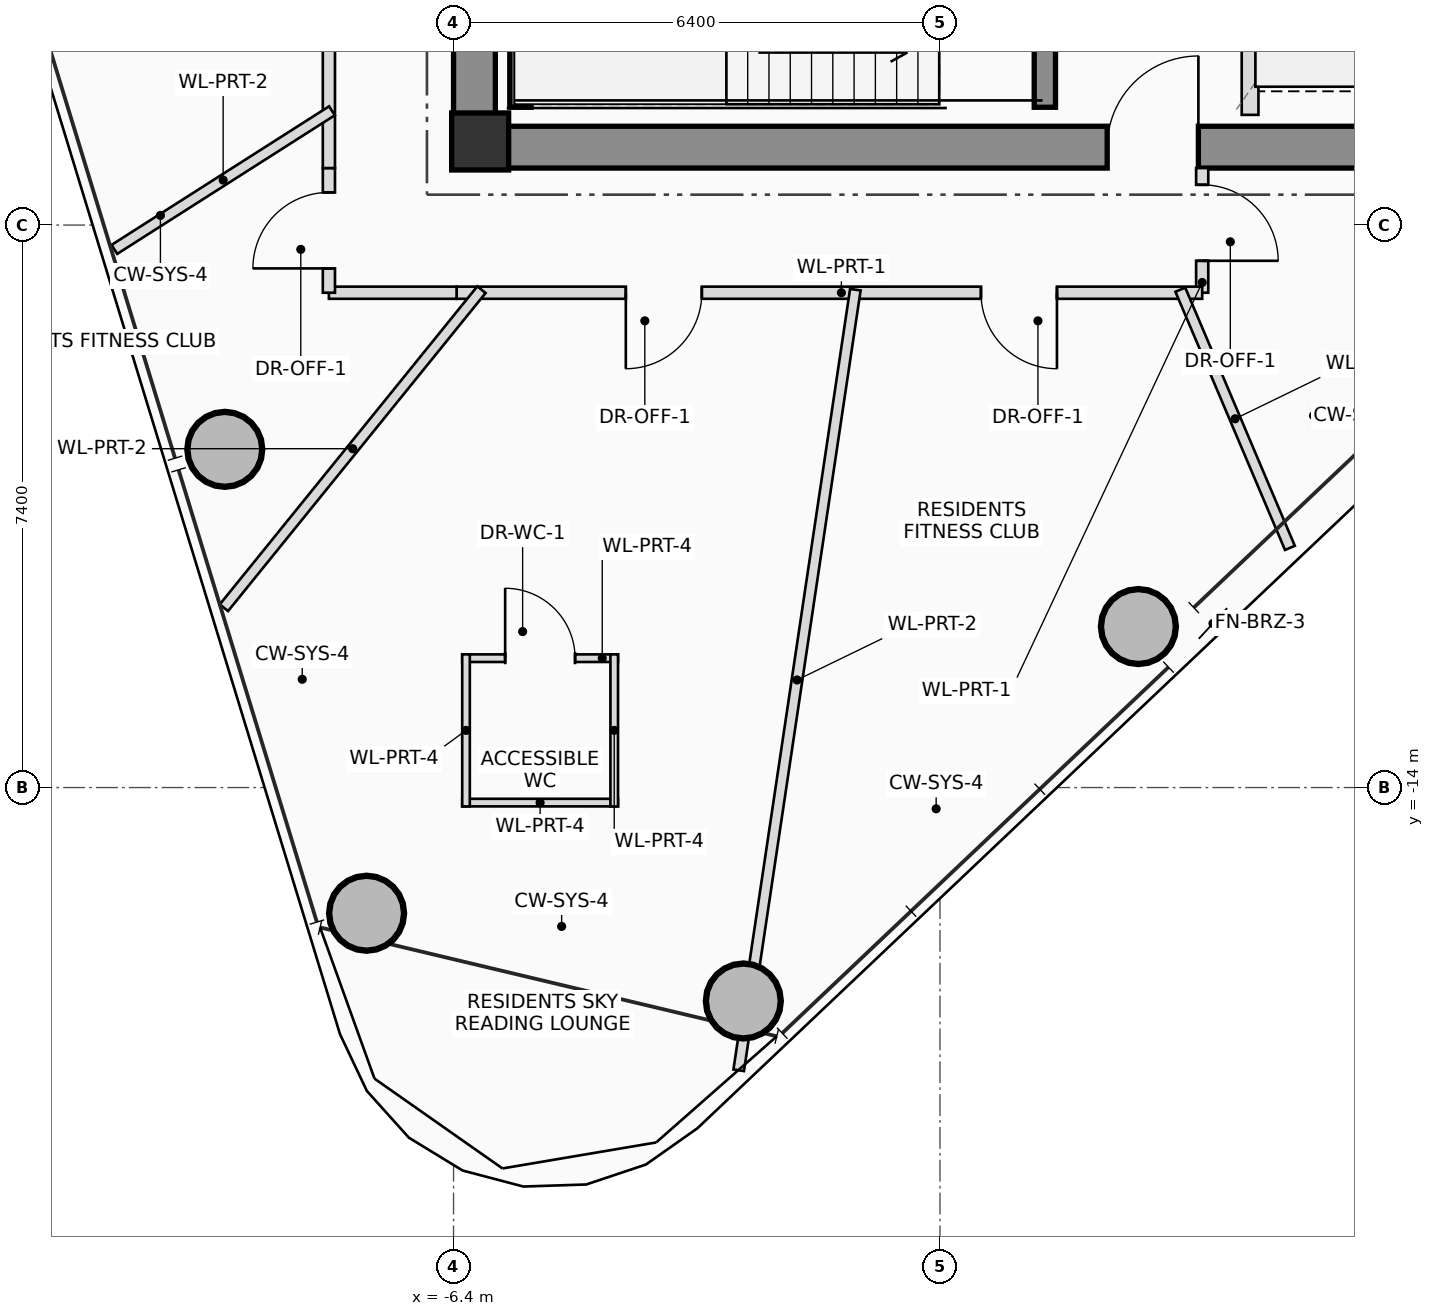
"""IFC4 building model, lengths in metres.
Left out: names, types, materials, properties, quantities, classifications, styles, units other than length and angle.
Written with IfcOpenShell. Run it as: python <this file> out.ifc"""

import sys

from ifc_helpers import new_model, si_unit, direction, frame, frame_2d, origin, origin_2d, place, context, subcontext, project, spatial, rectangle, hollow_circle, extrude, source, transform, mapped, element, fill, save


model = new_model("IFC4")
c1 = context("Model", 3, precision=1e-05, world=origin(), true_north=direction((0.0, 1.0)))
c2 = subcontext(c1, "Body", "Model", "MODEL_VIEW")
j1 = project(units=[si_unit("LENGTHUNIT", "METRE"), si_unit("PLANEANGLEUNIT", "RADIAN")], contexts=[c1])
p1 = place(None, origin())
s1 = spatial("IfcSite", under=j1, at=p1, CompositionType="ELEMENT")
p2 = place(p1, origin())
s2 = spatial("IfcBuilding", under=s1, at=p2, CompositionType="ELEMENT")
p3 = place(p2, frame((0.0, 0.0, 232.05)))
s3 = spatial("IfcBuildingStorey", under=s2, at=p3, CompositionType="ELEMENT", Elevation=232.05)
m1 = source(origin(), c2, "Body", "SweptSolid", [
    extrude(rectangle(XDim=0.75, YDim=0.75, at=origin_2d()), origin(), (0.0, 0.0, 1.0), 3.4),
])
p4 = place(p3, frame((-6.05, -5.5, 0.0), z_axis=(0.0, 0.0, 1.0), x_axis=(1.0, 0.0, 0.0)))
e1 = element("IfcColumn", 1, at=p4, inside=s3, PredefinedType="COLUMN", context=c2, shape_type="MappedRepresentation", body=[
    mapped(m1, transform((0.0, 0.0, 0.0), scale=1.0)),
])
p5 = place(p3, frame((-6.4, -5.575, 0.0), z_axis=(0.0, 0.0, 1.0), x_axis=(1.0, 0.0, 0.0)))
e2 = element("IfcWall", 2, at=p5, inside=s3, PredefinedType="SHEAR", context=c2, shape_type="SweptSolid", body=[
    extrude(rectangle(XDim=12.8, YDim=0.55, at=frame_2d((6.4, 0.0))), origin(), (0.0, 0.0, 1.0), 3.4),
])
p6 = place(p5, frame((8.6, 0.0, 0.0)))
e3 = element("IfcOpeningElement", 3, at=p6, cuts=e2, PredefinedType="OPENING", context=c2, shape_type="SweptSolid", body=[
    extrude(rectangle(XDim=1.2, YDim=2.2, at=frame_2d((0.6, 1.1))), frame((0.0, 0.285, 0.0), z_axis=(0.0, -1.0, 0.0), x_axis=(1.0, 0.0, 0.0)), (0.0, 0.0, 1.0), 0.57),
])
p7 = place(p3, frame((-6.125, -5.3, 0.0), z_axis=(0.0, 0.0, 1.0), x_axis=(0.0, 1.0, 0.0)))
e4 = element("IfcWall", 4, at=p7, inside=s3, PredefinedType="SHEAR", context=c2, shape_type="SweptSolid", body=[
    extrude(rectangle(XDim=3.55, YDim=0.55, at=frame_2d((1.775, 0.0))), origin(), (0.0, 0.0, 1.0), 3.4),
])
p8 = place(p3, frame((-5.52, -5.05, 0.0), z_axis=(0.0, 0.0, 1.0), x_axis=(0.0, 1.0, 0.0)))
e5 = element("IfcWall", 5, at=p8, inside=s3, PredefinedType="SHEAR", context=c2, shape_type="SweptSolid", body=[
    extrude(rectangle(XDim=2.75, YDim=0.28, at=frame_2d((1.375, 0.0))), origin(), (0.0, 0.0, 1.0), 3.4),
])
p9 = place(p3, frame((1.38, -5.05, 0.0), z_axis=(0.0, 0.0, 1.0), x_axis=(0.0, 1.0, 0.0)))
e6 = element("IfcWall", 6, at=p9, inside=s3, PredefinedType="SHEAR", context=c2, shape_type="SweptSolid", body=[
    extrude(rectangle(XDim=0.8, YDim=0.28, at=frame_2d((0.4, 0.0))), origin(), (0.0, 0.0, 1.0), 3.4),
])
m2 = source(origin(), c2, "Body", "SweptSolid", [
    extrude(hollow_circle(Radius=0.5, WallThickness=0.04, at=origin_2d()), origin(), (0.0, 0.0, 1.0), 3.4),
])
for number, where, z_axis, x_axis in (
    (7, (-2.587, -16.808, 0.0), (0.0, 0.0, 1.0), (1.0, 0.0, 0.0)),
    (8, (2.611, -11.882, 0.0), (0.0, 0.0, 1.0), (1.0, 0.0, 0.0)),
    (9, (-9.41, -9.55, 0.0), (0.0, 0.0, 1.0), (1.0, 0.0, 0.0)),
    (10, (-7.544, -15.653, 0.0), (0.0, 0.0, 1.0), (1.0, 0.0, 0.0)),
):
    element("IfcColumn", number, at=place(p3, frame(where, z_axis=z_axis, x_axis=x_axis)), inside=s3, PredefinedType="COLUMN", context=c2, shape_type="MappedRepresentation", body=[
        mapped(m2, transform((0.0, 0.0, 0.0), scale=1.0)),
    ])
p10 = place(p3, frame((4.08, -5.15, 0.0), z_axis=(0.0, 0.0, 1.0), x_axis=(0.0, 1.0, 0.0)))
e11 = element("IfcWall", 11, at=p10, inside=s3, PredefinedType="PLUMBINGWALL", context=c2, shape_type="SweptSolid", body=[
    extrude(rectangle(XDim=2.95, YDim=0.22, at=frame_2d((1.475, 0.0))), origin(), (0.0, 0.0, 1.0), 3.2),
])
p11 = place(p10, frame((0.95, 0.0, 0.0)))
e12 = element("IfcOpeningElement", 12, at=p11, cuts=e11, PredefinedType="OPENING", context=c2, shape_type="SweptSolid", body=[
    extrude(rectangle(XDim=1.2, YDim=2.25, at=frame_2d((0.6, 1.125))), frame((0.0, 0.12, 0.0), z_axis=(0.0, -1.0, 0.0), x_axis=(1.0, 0.0, 0.0)), (0.0, 0.0, 1.0), 0.24),
])
p12 = place(p3, frame((-6.286, -12.298, 0.0), z_axis=(0.0, 0.0, 1.0), x_axis=(1.0, 0.0, 0.0)))
e13 = element("IfcWall", 13, at=p12, inside=s3, PredefinedType="PARTITIONING", context=c2, shape_type="SweptSolid", body=[
    extrude(rectangle(XDim=2.05, YDim=0.1, at=frame_2d((1.025, 0.0))), origin(), (0.0, 0.0, 1.0), 3.2),
])
p13 = place(p12, frame((0.565, 0.0, 0.0)))
e14 = element("IfcOpeningElement", 14, at=p13, cuts=e13, PredefinedType="OPENING", context=c2, shape_type="SweptSolid", body=[
    extrude(rectangle(XDim=0.92, YDim=2.1, at=frame_2d((0.46, 1.05))), frame((0.0, 0.06, 0.0), z_axis=(0.0, -1.0, 0.0), x_axis=(1.0, 0.0, 0.0)), (0.0, 0.0, 1.0), 0.12),
])
p14 = place(p3, frame((-4.236, -14.198, 0.0), z_axis=(0.0, 0.0, 1.0), x_axis=(-1.0, 0.0, 0.0)))
e15 = element("IfcWall", 15, at=p14, inside=s3, PredefinedType="PARTITIONING", context=c2, shape_type="SweptSolid", body=[
    extrude(rectangle(XDim=2.05, YDim=0.1, at=frame_2d((1.025, 0.0))), origin(), (0.0, 0.0, 1.0), 3.2),
])
for number, where, z_axis, x_axis in (
    (16, (-4.286, -12.248, 0.0), (0.0, 0.0, 1.0), (0.0, -1.0, 0.0)),
    (17, (-6.236, -14.248, 0.0), (0.0, 0.0, 1.0), (0.0, 1.0, 0.0)),
):
    element("IfcWall", number, at=place(p3, frame(where, z_axis=z_axis, x_axis=x_axis)), inside=s3, PredefinedType="PARTITIONING", context=c2, shape_type="SweptSolid", body=[
        extrude(rectangle(XDim=2.0, YDim=0.1, at=frame_2d((1.0, 0.0))), origin(), (0.0, 0.0, 1.0), 2.855),
    ])
p15 = place(p3, frame((3.45, -5.85, 0.0), z_axis=(0.0, 0.0, 1.0), x_axis=(0.0, -1.0, 0.0)))
e18 = element("IfcWall", 18, at=p15, inside=s3, PredefinedType="PARTITIONING", context=c2, shape_type="SweptSolid", body=[
    extrude(rectangle(XDim=1.64, YDim=0.16, at=frame_2d((0.82, 0.0))), origin(), (0.0, 0.0, 1.0), 3.2),
])
p16 = place(p15, frame((0.22, 0.0, 0.0)))
e19 = element("IfcOpeningElement", 19, at=p16, cuts=e18, PredefinedType="OPENING", context=c2, shape_type="SweptSolid", body=[
    extrude(rectangle(XDim=1.0, YDim=2.25, at=frame_2d((0.5, 1.125))), frame((0.0, 0.09, 0.0), z_axis=(0.0, -1.0, 0.0), x_axis=(1.0, 0.0, 0.0)), (0.0, 0.0, 1.0), 0.18),
])
p17 = place(p3, frame((3.45, -7.49, 0.0), z_axis=(0.0, 0.0, 1.0), x_axis=(-1.0, 0.0, 0.0)))
e20 = element("IfcWall", 20, at=p17, inside=s3, PredefinedType="PARTITIONING", context=c2, shape_type="SweptSolid", body=[
    extrude(rectangle(XDim=9.81, YDim=0.16, at=frame_2d((4.905, 0.0))), origin(), (0.0, 0.0, 1.0), 2.605),
])
p18 = place(p17, frame((1.911, 0.0, 0.0)))
e21 = element("IfcOpeningElement", 21, at=p18, cuts=e20, PredefinedType="OPENING", context=c2, shape_type="SweptSolid", body=[
    extrude(rectangle(XDim=1.0, YDim=2.25, at=frame_2d((0.5, 1.125))), frame((0.0, 0.09, 0.0), z_axis=(0.0, -1.0, 0.0), x_axis=(1.0, 0.0, 0.0)), (0.0, 0.0, 1.0), 0.18),
])
p19 = place(p17, frame((6.583, 0.0, 0.0)))
e22 = element("IfcOpeningElement", 22, at=p19, cuts=e20, PredefinedType="OPENING", context=c2, shape_type="SweptSolid", body=[
    extrude(rectangle(XDim=1.0, YDim=2.25, at=frame_2d((0.5, 1.125))), frame((0.0, 0.09, 0.0), z_axis=(0.0, -1.0, 0.0), x_axis=(1.0, 0.0, 0.0)), (0.0, 0.0, 1.0), 0.18),
])
p20 = place(p3, frame((-6.36, -7.49, 0.0), z_axis=(0.0, 0.0, 1.0), x_axis=(-1.0, 0.0, 0.0)))
e23 = element("IfcWall", 23, at=p20, inside=s3, PredefinedType="PARTITIONING", context=c2, shape_type="SweptSolid", body=[
    extrude(rectangle(XDim=1.68, YDim=0.16, at=frame_2d((0.84, 0.0))), origin(), (0.0, 0.0, 1.0), 2.605),
])
p21 = place(p3, frame((-8.04, -7.49, 0.0), z_axis=(0.0, 0.0, 1.0), x_axis=(0.0, 1.0, 0.0)))
e24 = element("IfcWall", 24, at=p21, inside=s3, PredefinedType="PARTITIONING", context=c2, shape_type="SweptSolid", body=[
    extrude(rectangle(XDim=1.64, YDim=0.16, at=frame_2d((0.82, 0.0))), origin(), (0.0, 0.0, 1.0), 2.805),
])
p22 = place(p21, frame((0.32, 0.0, 0.0)))
e25 = element("IfcOpeningElement", 25, at=p22, cuts=e24, PredefinedType="OPENING", context=c2, shape_type="SweptSolid", body=[
    extrude(rectangle(XDim=1.0, YDim=2.25, at=frame_2d((0.5, 1.125))), frame((0.0, 0.09, 0.0), z_axis=(0.0, -1.0, 0.0), x_axis=(1.0, 0.0, 0.0)), (0.0, 0.0, 1.0), 0.18),
])
p23 = place(p3, frame((-8.04, -5.85, 0.0), z_axis=(0.0, 0.0, 1.0), x_axis=(0.0, 1.0, 0.0)))
e26 = element("IfcWall", 26, at=p23, inside=s3, PredefinedType="PARTITIONING", context=c2, shape_type="SweptSolid", body=[
    extrude(rectangle(XDim=11.7, YDim=0.16, at=frame_2d((5.85, 0.0))), origin(), (0.0, 0.0, 1.0), 2.605),
])
p24 = place(p23, frame((2.977, 0.0, 0.0)))
e27 = element("IfcOpeningElement", 27, at=p24, cuts=e26, PredefinedType="OPENING", context=c2, shape_type="SweptSolid", body=[
    extrude(rectangle(XDim=1.0, YDim=2.25, at=frame_2d((0.5, 1.125))), frame((0.0, 0.09, 0.0), z_axis=(0.0, -1.0, 0.0), x_axis=(1.0, 0.0, 0.0)), (0.0, 0.0, 1.0), 0.18),
])
p25 = place(p23, frame((6.919, 0.0, 0.0)))
e28 = element("IfcOpeningElement", 28, at=p25, cuts=e26, PredefinedType="OPENING", context=c2, shape_type="SweptSolid", body=[
    extrude(rectangle(XDim=1.0, YDim=2.25, at=frame_2d((0.5, 1.125))), frame((0.0, 0.09, 0.0), z_axis=(0.0, -1.0, 0.0), x_axis=(1.0, 0.0, 0.0)), (0.0, 0.0, 1.0), 0.18),
])
p26 = place(p3, frame((-8.0, -5.097, 0.0), z_axis=(0.0, 0.0, 1.0), x_axis=(-0.843391828446, -0.537299007733, 0.0)))
e29 = element("IfcWall", 29, at=p26, inside=s3, PredefinedType="PARTITIONING", context=c2, shape_type="SweptSolid", body=[
    extrude(rectangle(XDim=3.394, YDim=0.14, at=frame_2d((1.697, 0.0))), origin(), (0.0, 0.0, 1.0), 2.765),
])
p27 = place(p3, frame((-6.033, -7.45, 0.0), z_axis=(0.0, 0.0, 1.0), x_axis=(-0.629318234002, -0.777147708195, 0.0)))
e30 = element("IfcWall", 30, at=p27, inside=s3, PredefinedType="PARTITIONING", context=c2, shape_type="SweptSolid", body=[
    extrude(rectangle(XDim=5.384, YDim=0.14, at=frame_2d((2.692, 0.0))), origin(), (0.0, 0.0, 1.0), 2.605),
])
p28 = place(p3, frame((-1.113, -7.45, 0.0), z_axis=(0.0, 0.0, 1.0), x_axis=(-0.147817313856, -0.989014682259, 0.0)))
e31 = element("IfcWall", 31, at=p28, inside=s3, PredefinedType="PARTITIONING", context=c2, shape_type="SweptSolid", body=[
    extrude(rectangle(XDim=10.384, YDim=0.14, at=frame_2d((5.192, 0.0))), origin(), (0.0, 0.0, 1.0), 2.805),
])
p29 = place(p3, frame((3.162, -7.45, 0.0), z_axis=(0.0, 0.0, 1.0), x_axis=(0.39072313519, -0.920508246366, 0.0)))
e32 = element("IfcWall", 32, at=p29, inside=s3, PredefinedType="PARTITIONING", context=c2, shape_type="SweptSolid", body=[
    extrude(rectangle(XDim=3.69, YDim=0.14, at=frame_2d((1.845, 0.0))), origin(), (0.0, 0.0, 1.0), 2.605),
])
p30 = place(p6, origin())
e33 = element("IfcDoor", 33, at=p30, inside=s3, OperationType="SINGLE_SWING_RIGHT", PredefinedType="DOOR", context=c2, shape_type="SweptSolid", body=[
    extrude(rectangle(XDim=1.2, YDim=2.2, at=frame_2d((0.6, 1.1))), frame((0.0, 0.025, 0.0), z_axis=(0.0, -1.0, 0.0), x_axis=(1.0, 0.0, 0.0)), (0.0, 0.0, 1.0), 0.05),
])
fill(e3, e33)
p31 = place(p13, origin())
e34 = element("IfcDoor", 34, at=p31, inside=s3, OperationType="SINGLE_SWING_LEFT", PredefinedType="DOOR", context=c2, shape_type="SweptSolid", body=[
    extrude(rectangle(XDim=0.92, YDim=2.1, at=frame_2d((0.46, 1.05))), frame((0.0, 0.025, 0.0), z_axis=(0.0, -1.0, 0.0), x_axis=(1.0, 0.0, 0.0)), (0.0, 0.0, 1.0), 0.05),
])
fill(e14, e34)
p32 = place(p16, origin())
e35 = element("IfcDoor", 35, at=p32, inside=s3, OperationType="SINGLE_SWING_RIGHT", PredefinedType="DOOR", context=c2, shape_type="SweptSolid", body=[
    extrude(rectangle(XDim=1.0, YDim=2.25, at=frame_2d((0.5, 1.125))), frame((0.0, 0.025, 0.0), z_axis=(0.0, -1.0, 0.0), x_axis=(1.0, 0.0, 0.0)), (0.0, 0.0, 1.0), 0.05),
])
fill(e19, e35)
p33 = place(p18, origin())
e36 = element("IfcDoor", 36, at=p33, inside=s3, OperationType="SINGLE_SWING_LEFT", PredefinedType="DOOR", context=c2, shape_type="SweptSolid", body=[
    extrude(rectangle(XDim=1.0, YDim=2.25, at=frame_2d((0.5, 1.125))), frame((0.0, 0.025, 0.0), z_axis=(0.0, -1.0, 0.0), x_axis=(1.0, 0.0, 0.0)), (0.0, 0.0, 1.0), 0.05),
])
fill(e21, e36)
p34 = place(p19, origin())
e37 = element("IfcDoor", 37, at=p34, inside=s3, OperationType="SINGLE_SWING_RIGHT", PredefinedType="DOOR", context=c2, shape_type="SweptSolid", body=[
    extrude(rectangle(XDim=1.0, YDim=2.25, at=frame_2d((0.5, 1.125))), frame((0.0, 0.025, 0.0), z_axis=(0.0, -1.0, 0.0), x_axis=(1.0, 0.0, 0.0)), (0.0, 0.0, 1.0), 0.05),
])
fill(e22, e37)
p35 = place(p22, origin())
e38 = element("IfcDoor", 38, at=p35, inside=s3, OperationType="SINGLE_SWING_LEFT", PredefinedType="DOOR", context=c2, shape_type="SweptSolid", body=[
    extrude(rectangle(XDim=1.0, YDim=2.25, at=frame_2d((0.5, 1.125))), frame((0.0, 0.025, 0.0), z_axis=(0.0, -1.0, 0.0), x_axis=(1.0, 0.0, 0.0)), (0.0, 0.0, 1.0), 0.05),
])
fill(e25, e38)
save(model, sys.argv[1])
